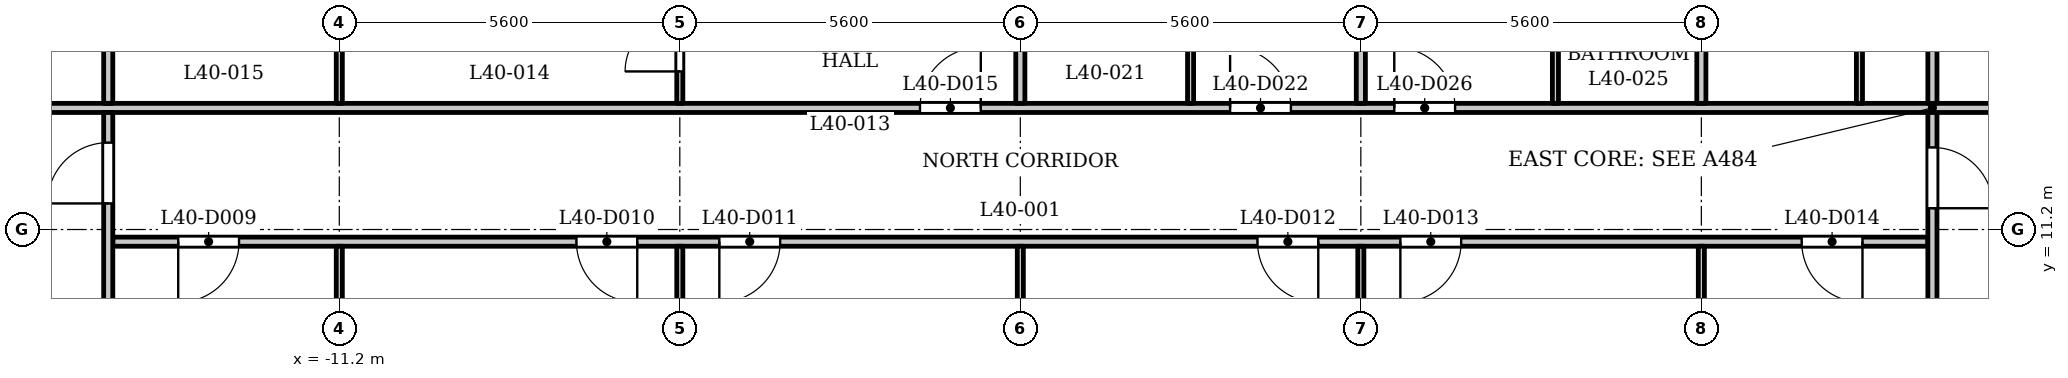
"""IFC4 building model, lengths in metres.
Left out: names, types, materials, properties, quantities, classifications, styles, units other than length and angle.
Written with IfcOpenShell. Run it as: python <this file> out.ifc"""

import sys

from ifc_helpers import new_model, si_unit, direction, frame, frame_2d, origin, place, context, subcontext, project, spatial, rectangle, extrude, element, fill, save


model = new_model("IFC4")
c1 = context("Model", 3, precision=1e-05, world=origin(), true_north=direction((0.0, 1.0)))
c2 = subcontext(c1, "Body", "Model", "MODEL_VIEW")
j1 = project(units=[si_unit("LENGTHUNIT", "METRE"), si_unit("PLANEANGLEUNIT", "RADIAN")], contexts=[c1])
p1 = place(None, origin())
s1 = spatial("IfcSite", under=j1, at=p1, CompositionType="ELEMENT")
p2 = place(p1, origin())
s2 = spatial("IfcBuilding", under=s1, at=p2, CompositionType="ELEMENT")
p3 = place(p2, frame((0.0, 0.0, 157.1)))
s3 = spatial("IfcBuildingStorey", under=s2, at=p3, CompositionType="ELEMENT", Elevation=157.1)
p4 = place(p3, frame((-14.925, 11.0, 0.0), z_axis=(0.0, 0.0, 1.0), x_axis=(1.0, 0.0, 0.0)))
e1 = element("IfcWall", 1, at=p4, inside=s3, PredefinedType="PARTITIONING", context=c2, shape_type="SweptSolid", body=[
    extrude(rectangle(XDim=29.85, YDim=0.15, at=frame_2d((14.925, 0.0))), origin(), (0.0, 0.0, 1.0), 3.2),
])
p5 = place(p4, frame((1.076, 0.0, 0.0)))
e2 = element("IfcOpeningElement", 2, at=p5, cuts=e1, PredefinedType="OPENING", context=c2, shape_type="SweptSolid", body=[
    extrude(rectangle(XDim=1.0, YDim=2.1, at=frame_2d((0.5, 1.05))), frame((0.0, 0.085, 0.0), z_axis=(0.0, -1.0, 0.0), x_axis=(1.0, 0.0, 0.0)), (0.0, 0.0, 1.0), 0.17),
])
p6 = place(p4, frame((7.625, 0.0, 0.0)))
e3 = element("IfcOpeningElement", 3, at=p6, cuts=e1, PredefinedType="OPENING", context=c2, shape_type="SweptSolid", body=[
    extrude(rectangle(XDim=1.0, YDim=2.1, at=frame_2d((0.5, 1.05))), frame((0.0, 0.085, 0.0), z_axis=(0.0, -1.0, 0.0), x_axis=(1.0, 0.0, 0.0)), (0.0, 0.0, 1.0), 0.17),
])
p7 = place(p4, frame((9.975, 0.0, 0.0)))
e4 = element("IfcOpeningElement", 4, at=p7, cuts=e1, PredefinedType="OPENING", context=c2, shape_type="SweptSolid", body=[
    extrude(rectangle(XDim=1.0, YDim=2.1, at=frame_2d((0.5, 1.05))), frame((0.0, 0.085, 0.0), z_axis=(0.0, -1.0, 0.0), x_axis=(1.0, 0.0, 0.0)), (0.0, 0.0, 1.0), 0.17),
])
p8 = place(p4, frame((18.825, 0.0, 0.0)))
e5 = element("IfcOpeningElement", 5, at=p8, cuts=e1, PredefinedType="OPENING", context=c2, shape_type="SweptSolid", body=[
    extrude(rectangle(XDim=1.0, YDim=2.1, at=frame_2d((0.5, 1.05))), frame((0.0, 0.085, 0.0), z_axis=(0.0, -1.0, 0.0), x_axis=(1.0, 0.0, 0.0)), (0.0, 0.0, 1.0), 0.17),
])
p9 = place(p4, frame((21.175, 0.0, 0.0)))
e6 = element("IfcOpeningElement", 6, at=p9, cuts=e1, PredefinedType="OPENING", context=c2, shape_type="SweptSolid", body=[
    extrude(rectangle(XDim=1.0, YDim=2.1, at=frame_2d((0.5, 1.05))), frame((0.0, 0.085, 0.0), z_axis=(0.0, -1.0, 0.0), x_axis=(1.0, 0.0, 0.0)), (0.0, 0.0, 1.0), 0.17),
])
p10 = place(p4, frame((27.775, 0.0, 0.0)))
e7 = element("IfcOpeningElement", 7, at=p10, cuts=e1, PredefinedType="OPENING", context=c2, shape_type="SweptSolid", body=[
    extrude(rectangle(XDim=1.0, YDim=2.1, at=frame_2d((0.5, 1.05))), frame((0.0, 0.085, 0.0), z_axis=(0.0, -1.0, 0.0), x_axis=(1.0, 0.0, 0.0)), (0.0, 0.0, 1.0), 0.17),
])
p11 = place(p3, frame((-17.4, 13.2, 0.0), z_axis=(0.0, 0.0, 1.0), x_axis=(1.0, 0.0, 0.0)))
e8 = element("IfcWall", 8, at=p11, inside=s3, PredefinedType="PARTITIONING", context=c2, shape_type="SweptSolid", body=[
    extrude(rectangle(XDim=34.8, YDim=0.15, at=frame_2d((17.4, 0.0))), origin(), (0.0, 0.0, 1.0), 3.2),
])
p12 = place(p11, frame((0.25, 0.0, 0.0)))
e9 = element("IfcOpeningElement", 9, at=p12, cuts=e8, PredefinedType="OPENING", context=c2, shape_type="SweptSolid", body=[
    extrude(rectangle(XDim=1.0, YDim=2.1, at=frame_2d((0.5, 1.05))), frame((0.0, 0.085, 0.0), z_axis=(0.0, -1.0, 0.0), x_axis=(1.0, 0.0, 0.0)), (0.0, 0.0, 1.0), 0.17),
])
p13 = place(p11, frame((33.65, 0.0, 0.0)))
e10 = element("IfcOpeningElement", 10, at=p13, cuts=e8, PredefinedType="OPENING", context=c2, shape_type="SweptSolid", body=[
    extrude(rectangle(XDim=1.0, YDim=2.1, at=frame_2d((0.5, 1.05))), frame((0.0, 0.085, 0.0), z_axis=(0.0, -1.0, 0.0), x_axis=(1.0, 0.0, 0.0)), (0.0, 0.0, 1.0), 0.17),
])
p14 = place(p11, frame((15.75, 0.0, 0.0)))
e11 = element("IfcOpeningElement", 11, at=p14, cuts=e8, PredefinedType="OPENING", context=c2, shape_type="SweptSolid", body=[
    extrude(rectangle(XDim=1.0, YDim=2.1, at=frame_2d((0.5, 1.05))), frame((0.0, 0.085, 0.0), z_axis=(0.0, -1.0, 0.0), x_axis=(1.0, 0.0, 0.0)), (0.0, 0.0, 1.0), 0.17),
])
p15 = place(p11, frame((20.85, 0.0, 0.0)))
e12 = element("IfcOpeningElement", 12, at=p15, cuts=e8, PredefinedType="OPENING", context=c2, shape_type="SweptSolid", body=[
    extrude(rectangle(XDim=1.0, YDim=2.1, at=frame_2d((0.5, 1.05))), frame((0.0, 0.085, 0.0), z_axis=(0.0, -1.0, 0.0), x_axis=(1.0, 0.0, 0.0)), (0.0, 0.0, 1.0), 0.17),
])
p16 = place(p11, frame((23.55, 0.0, 0.0)))
e13 = element("IfcOpeningElement", 13, at=p16, cuts=e8, PredefinedType="OPENING", context=c2, shape_type="SweptSolid", body=[
    extrude(rectangle(XDim=1.0, YDim=2.1, at=frame_2d((0.5, 1.05))), frame((0.0, 0.085, 0.0), z_axis=(0.0, -1.0, 0.0), x_axis=(1.0, 0.0, 0.0)), (0.0, 0.0, 1.0), 0.17),
])
p17 = place(p3, frame((-15.0, 6.769, 0.0), z_axis=(0.0, 0.0, 1.0), x_axis=(0.0, 1.0, 0.0)))
e14 = element("IfcWall", 14, at=p17, inside=s3, PredefinedType="PARTITIONING", context=c2, shape_type="SweptSolid", body=[
    extrude(rectangle(XDim=6.356, YDim=0.15, at=frame_2d((3.178, 0.0))), origin(), (0.0, 0.0, 1.0), 3.2),
])
p18 = place(p17, frame((4.86, 0.0, 0.0)))
e15 = element("IfcOpeningElement", 15, at=p18, cuts=e14, PredefinedType="OPENING", context=c2, shape_type="SweptSolid", body=[
    extrude(rectangle(XDim=1.0, YDim=2.1, at=frame_2d((0.5, 1.05))), frame((0.0, 0.085, 0.0), z_axis=(0.0, -1.0, 0.0), x_axis=(1.0, 0.0, 0.0)), (0.0, 0.0, 1.0), 0.17),
])
p19 = place(p3, frame((-15.0, 13.275, 0.0), z_axis=(0.0, 0.0, 1.0), x_axis=(0.0, 1.0, 0.0)))
e16 = element("IfcWall", 16, at=p19, inside=s3, PredefinedType="PARTITIONING", context=c2, shape_type="SweptSolid", body=[
    extrude(rectangle(XDim=2.05, YDim=0.15, at=frame_2d((1.025, 0.0))), origin(), (0.0, 0.0, 1.0), 3.2),
])
p20 = place(p3, frame((-11.2, 7.32, 0.0), z_axis=(0.0, 0.0, 1.0), x_axis=(0.0, 1.0, 0.0)))
e17 = element("IfcWall", 17, at=p20, inside=s3, PredefinedType="PARTITIONING", context=c2, shape_type="SweptSolid", body=[
    extrude(rectangle(XDim=3.605, YDim=0.1, at=frame_2d((1.802, 0.0))), origin(), (0.0, 0.0, 1.0), 3.2),
])
p21 = place(p3, frame((-11.2, 13.275, 0.0), z_axis=(0.0, 0.0, 1.0), x_axis=(0.0, 1.0, 0.0)))
e18 = element("IfcWall", 18, at=p21, inside=s3, PredefinedType="PARTITIONING", context=c2, shape_type="SweptSolid", body=[
    extrude(rectangle(XDim=3.775, YDim=0.1, at=frame_2d((1.888, 0.0))), origin(), (0.0, 0.0, 1.0), 3.2),
])
p22 = place(p21, frame((2.875, 0.0, 0.0)))
e19 = element("IfcOpeningElement", 19, at=p22, cuts=e18, PredefinedType="OPENING", context=c2, shape_type="SweptSolid", body=[
    extrude(rectangle(XDim=0.8, YDim=2.1, at=frame_2d((0.4, 1.05))), frame((0.0, 0.06, 0.0), z_axis=(0.0, -1.0, 0.0), x_axis=(1.0, 0.0, 0.0)), (0.0, 0.0, 1.0), 0.12),
])
p23 = place(p3, frame((-5.6, 7.32, 0.0), z_axis=(0.0, 0.0, 1.0), x_axis=(0.0, 1.0, 0.0)))
e20 = element("IfcWall", 20, at=p23, inside=s3, PredefinedType="PARTITIONING", context=c2, shape_type="SweptSolid", body=[
    extrude(rectangle(XDim=3.605, YDim=0.1, at=frame_2d((1.802, 0.0))), origin(), (0.0, 0.0, 1.0), 3.2),
])
p24 = place(p3, frame((-5.6, 13.275, 0.0), z_axis=(0.0, 0.0, 1.0), x_axis=(0.0, 1.0, 0.0)))
e21 = element("IfcWall", 21, at=p24, inside=s3, PredefinedType="PARTITIONING", context=c2, shape_type="SweptSolid", body=[
    extrude(rectangle(XDim=3.775, YDim=0.1, at=frame_2d((1.888, 0.0))), origin(), (0.0, 0.0, 1.0), 3.2),
])
p25 = place(p24, frame((0.525, 0.0, 0.0)))
e22 = element("IfcOpeningElement", 22, at=p25, cuts=e21, PredefinedType="OPENING", context=c2, shape_type="SweptSolid", body=[
    extrude(rectangle(XDim=0.9, YDim=2.1, at=frame_2d((0.45, 1.05))), frame((0.0, 0.06, 0.0), z_axis=(0.0, -1.0, 0.0), x_axis=(1.0, 0.0, 0.0)), (0.0, 0.0, 1.0), 0.12),
])
p26 = place(p3, frame((0.0, 7.32, 0.0), z_axis=(0.0, 0.0, 1.0), x_axis=(0.0, 1.0, 0.0)))
e23 = element("IfcWall", 23, at=p26, inside=s3, PredefinedType="PARTITIONING", context=c2, shape_type="SweptSolid", body=[
    extrude(rectangle(XDim=3.605, YDim=0.1, at=frame_2d((1.802, 0.0))), origin(), (0.0, 0.0, 1.0), 3.2),
])
p27 = place(p3, frame((0.0, 13.275, 0.0), z_axis=(0.0, 0.0, 1.0), x_axis=(0.0, 1.0, 0.0)))
e24 = element("IfcWall", 24, at=p27, inside=s3, PredefinedType="PARTITIONING", context=c2, shape_type="SweptSolid", body=[
    extrude(rectangle(XDim=3.775, YDim=0.15, at=frame_2d((1.888, 0.0))), origin(), (0.0, 0.0, 1.0), 3.2),
])
p28 = place(p3, frame((2.8, 13.275, 0.0), z_axis=(0.0, 0.0, 1.0), x_axis=(0.0, 1.0, 0.0)))
e25 = element("IfcWall", 25, at=p28, inside=s3, PredefinedType="PARTITIONING", context=c2, shape_type="SweptSolid", body=[
    extrude(rectangle(XDim=3.775, YDim=0.1, at=frame_2d((1.888, 0.0))), origin(), (0.0, 0.0, 1.0), 3.2),
])
p29 = place(p3, frame((5.6, 7.32, 0.0), z_axis=(0.0, 0.0, 1.0), x_axis=(0.0, 1.0, 0.0)))
e26 = element("IfcWall", 26, at=p29, inside=s3, PredefinedType="PARTITIONING", context=c2, shape_type="SweptSolid", body=[
    extrude(rectangle(XDim=3.605, YDim=0.1, at=frame_2d((1.802, 0.0))), origin(), (0.0, 0.0, 1.0), 3.2),
])
p30 = place(p3, frame((5.6, 13.275, 0.0), z_axis=(0.0, 0.0, 1.0), x_axis=(0.0, 1.0, 0.0)))
e27 = element("IfcWall", 27, at=p30, inside=s3, PredefinedType="PARTITIONING", context=c2, shape_type="SweptSolid", body=[
    extrude(rectangle(XDim=3.775, YDim=0.15, at=frame_2d((1.888, 0.0))), origin(), (0.0, 0.0, 1.0), 3.2),
])
p31 = place(p3, frame((8.8, 13.275, 0.0), z_axis=(0.0, 0.0, 1.0), x_axis=(0.0, 1.0, 0.0)))
e28 = element("IfcWall", 28, at=p31, inside=s3, PredefinedType="PARTITIONING", context=c2, shape_type="SweptSolid", body=[
    extrude(rectangle(XDim=3.775, YDim=0.1, at=frame_2d((1.888, 0.0))), origin(), (0.0, 0.0, 1.0), 3.2),
])
p32 = place(p3, frame((11.2, 7.32, 0.0), z_axis=(0.0, 0.0, 1.0), x_axis=(0.0, 1.0, 0.0)))
e29 = element("IfcWall", 29, at=p32, inside=s3, PredefinedType="PARTITIONING", context=c2, shape_type="SweptSolid", body=[
    extrude(rectangle(XDim=3.605, YDim=0.1, at=frame_2d((1.802, 0.0))), origin(), (0.0, 0.0, 1.0), 3.2),
])
p33 = place(p3, frame((11.2, 13.275, 0.0), z_axis=(0.0, 0.0, 1.0), x_axis=(0.0, 1.0, 0.0)))
e30 = element("IfcWall", 30, at=p33, inside=s3, PredefinedType="PARTITIONING", context=c2, shape_type="SweptSolid", body=[
    extrude(rectangle(XDim=3.775, YDim=0.15, at=frame_2d((1.888, 0.0))), origin(), (0.0, 0.0, 1.0), 3.2),
])
p34 = place(p3, frame((13.8, 13.275, 0.0), z_axis=(0.0, 0.0, 1.0), x_axis=(0.0, 1.0, 0.0)))
e31 = element("IfcWall", 31, at=p34, inside=s3, PredefinedType="PARTITIONING", context=c2, shape_type="SweptSolid", body=[
    extrude(rectangle(XDim=3.775, YDim=0.1, at=frame_2d((1.888, 0.0))), origin(), (0.0, 0.0, 1.0), 3.2),
])
p35 = place(p3, frame((15.0, 6.769, 0.0), z_axis=(0.0, 0.0, 1.0), x_axis=(0.0, 1.0, 0.0)))
e32 = element("IfcWall", 32, at=p35, inside=s3, PredefinedType="PARTITIONING", context=c2, shape_type="SweptSolid", body=[
    extrude(rectangle(XDim=6.356, YDim=0.15, at=frame_2d((3.178, 0.0))), origin(), (0.0, 0.0, 1.0), 3.2),
])
p36 = place(p35, frame((4.781, 0.0, 0.0)))
e33 = element("IfcOpeningElement", 33, at=p36, cuts=e32, PredefinedType="OPENING", context=c2, shape_type="SweptSolid", body=[
    extrude(rectangle(XDim=1.0, YDim=2.1, at=frame_2d((0.5, 1.05))), frame((0.0, 0.085, 0.0), z_axis=(0.0, -1.0, 0.0), x_axis=(1.0, 0.0, 0.0)), (0.0, 0.0, 1.0), 0.17),
])
p37 = place(p3, frame((15.0, 13.275, 0.0), z_axis=(0.0, 0.0, 1.0), x_axis=(0.0, 1.0, 0.0)))
e34 = element("IfcWall", 34, at=p37, inside=s3, PredefinedType="PARTITIONING", context=c2, shape_type="SweptSolid", body=[
    extrude(rectangle(XDim=2.05, YDim=0.15, at=frame_2d((1.025, 0.0))), origin(), (0.0, 0.0, 1.0), 3.2),
])
p38 = place(p18, origin())
e35 = element("IfcDoor", 35, at=p38, inside=s3, OperationType="SINGLE_SWING_RIGHT", PredefinedType="DOOR", context=c2, shape_type="SweptSolid", body=[
    extrude(rectangle(XDim=1.0, YDim=2.1, at=frame_2d((0.5, 1.05))), frame((0.0, 0.025, 0.0), z_axis=(0.0, -1.0, 0.0), x_axis=(1.0, 0.0, 0.0)), (0.0, 0.0, 1.0), 0.05),
])
fill(e15, e35)
p39 = place(p36, origin())
e36 = element("IfcDoor", 36, at=p39, inside=s3, OperationType="SINGLE_SWING_LEFT", PredefinedType="DOOR", context=c2, shape_type="SweptSolid", body=[
    extrude(rectangle(XDim=1.0, YDim=2.1, at=frame_2d((0.5, 1.05))), frame((0.0, 0.025, 0.0), z_axis=(0.0, -1.0, 0.0), x_axis=(1.0, 0.0, 0.0)), (0.0, 0.0, 1.0), 0.05),
])
fill(e33, e36)
p40 = place(p5, origin())
e37 = element("IfcDoor", 37, at=p40, inside=s3, OperationType="SINGLE_SWING_LEFT", PredefinedType="DOOR", context=c2, shape_type="SweptSolid", body=[
    extrude(rectangle(XDim=1.0, YDim=2.1, at=frame_2d((0.5, 1.05))), frame((0.0, 0.025, 0.0), z_axis=(0.0, -1.0, 0.0), x_axis=(1.0, 0.0, 0.0)), (0.0, 0.0, 1.0), 0.05),
])
fill(e2, e37)
p41 = place(p6, origin())
e38 = element("IfcDoor", 38, at=p41, inside=s3, OperationType="SINGLE_SWING_RIGHT", PredefinedType="DOOR", context=c2, shape_type="SweptSolid", body=[
    extrude(rectangle(XDim=1.0, YDim=2.1, at=frame_2d((0.5, 1.05))), frame((0.0, 0.025, 0.0), z_axis=(0.0, -1.0, 0.0), x_axis=(1.0, 0.0, 0.0)), (0.0, 0.0, 1.0), 0.05),
])
fill(e3, e38)
p42 = place(p7, origin())
e39 = element("IfcDoor", 39, at=p42, inside=s3, OperationType="SINGLE_SWING_LEFT", PredefinedType="DOOR", context=c2, shape_type="SweptSolid", body=[
    extrude(rectangle(XDim=1.0, YDim=2.1, at=frame_2d((0.5, 1.05))), frame((0.0, 0.025, 0.0), z_axis=(0.0, -1.0, 0.0), x_axis=(1.0, 0.0, 0.0)), (0.0, 0.0, 1.0), 0.05),
])
fill(e4, e39)
p43 = place(p8, origin())
e40 = element("IfcDoor", 40, at=p43, inside=s3, OperationType="SINGLE_SWING_RIGHT", PredefinedType="DOOR", context=c2, shape_type="SweptSolid", body=[
    extrude(rectangle(XDim=1.0, YDim=2.1, at=frame_2d((0.5, 1.05))), frame((0.0, 0.025, 0.0), z_axis=(0.0, -1.0, 0.0), x_axis=(1.0, 0.0, 0.0)), (0.0, 0.0, 1.0), 0.05),
])
fill(e5, e40)
p44 = place(p9, origin())
e41 = element("IfcDoor", 41, at=p44, inside=s3, OperationType="SINGLE_SWING_LEFT", PredefinedType="DOOR", context=c2, shape_type="SweptSolid", body=[
    extrude(rectangle(XDim=1.0, YDim=2.1, at=frame_2d((0.5, 1.05))), frame((0.0, 0.025, 0.0), z_axis=(0.0, -1.0, 0.0), x_axis=(1.0, 0.0, 0.0)), (0.0, 0.0, 1.0), 0.05),
])
fill(e6, e41)
p45 = place(p10, origin())
e42 = element("IfcDoor", 42, at=p45, inside=s3, OperationType="SINGLE_SWING_RIGHT", PredefinedType="DOOR", context=c2, shape_type="SweptSolid", body=[
    extrude(rectangle(XDim=1.0, YDim=2.1, at=frame_2d((0.5, 1.05))), frame((0.0, 0.025, 0.0), z_axis=(0.0, -1.0, 0.0), x_axis=(1.0, 0.0, 0.0)), (0.0, 0.0, 1.0), 0.05),
])
fill(e7, e42)
p46 = place(p14, origin())
e43 = element("IfcDoor", 43, at=p46, inside=s3, OperationType="SINGLE_SWING_LEFT", PredefinedType="DOOR", context=c2, shape_type="SweptSolid", body=[
    extrude(rectangle(XDim=1.0, YDim=2.1, at=frame_2d((0.5, 1.05))), frame((0.0, 0.025, 0.0), z_axis=(0.0, -1.0, 0.0), x_axis=(1.0, 0.0, 0.0)), (0.0, 0.0, 1.0), 0.05),
])
fill(e11, e43)
p47 = place(p25, origin())
e44 = element("IfcDoor", 44, at=p47, inside=s3, OperationType="SINGLE_SWING_RIGHT", PredefinedType="DOOR", context=c2, shape_type="SweptSolid", body=[
    extrude(rectangle(XDim=0.9, YDim=2.1, at=frame_2d((0.45, 1.05))), frame((0.0, 0.025, 0.0), z_axis=(0.0, -1.0, 0.0), x_axis=(1.0, 0.0, 0.0)), (0.0, 0.0, 1.0), 0.05),
])
fill(e22, e44)
p48 = place(p15, origin())
e45 = element("IfcDoor", 45, at=p48, inside=s3, OperationType="SINGLE_SWING_RIGHT", PredefinedType="DOOR", context=c2, shape_type="SweptSolid", body=[
    extrude(rectangle(XDim=1.0, YDim=2.1, at=frame_2d((0.5, 1.05))), frame((0.0, 0.025, 0.0), z_axis=(0.0, -1.0, 0.0), x_axis=(1.0, 0.0, 0.0)), (0.0, 0.0, 1.0), 0.05),
])
fill(e12, e45)
p49 = place(p16, origin())
e46 = element("IfcDoor", 46, at=p49, inside=s3, OperationType="SINGLE_SWING_RIGHT", PredefinedType="DOOR", context=c2, shape_type="SweptSolid", body=[
    extrude(rectangle(XDim=1.0, YDim=2.1, at=frame_2d((0.5, 1.05))), frame((0.0, 0.025, 0.0), z_axis=(0.0, -1.0, 0.0), x_axis=(1.0, 0.0, 0.0)), (0.0, 0.0, 1.0), 0.05),
])
fill(e13, e46)
save(model, sys.argv[1])
